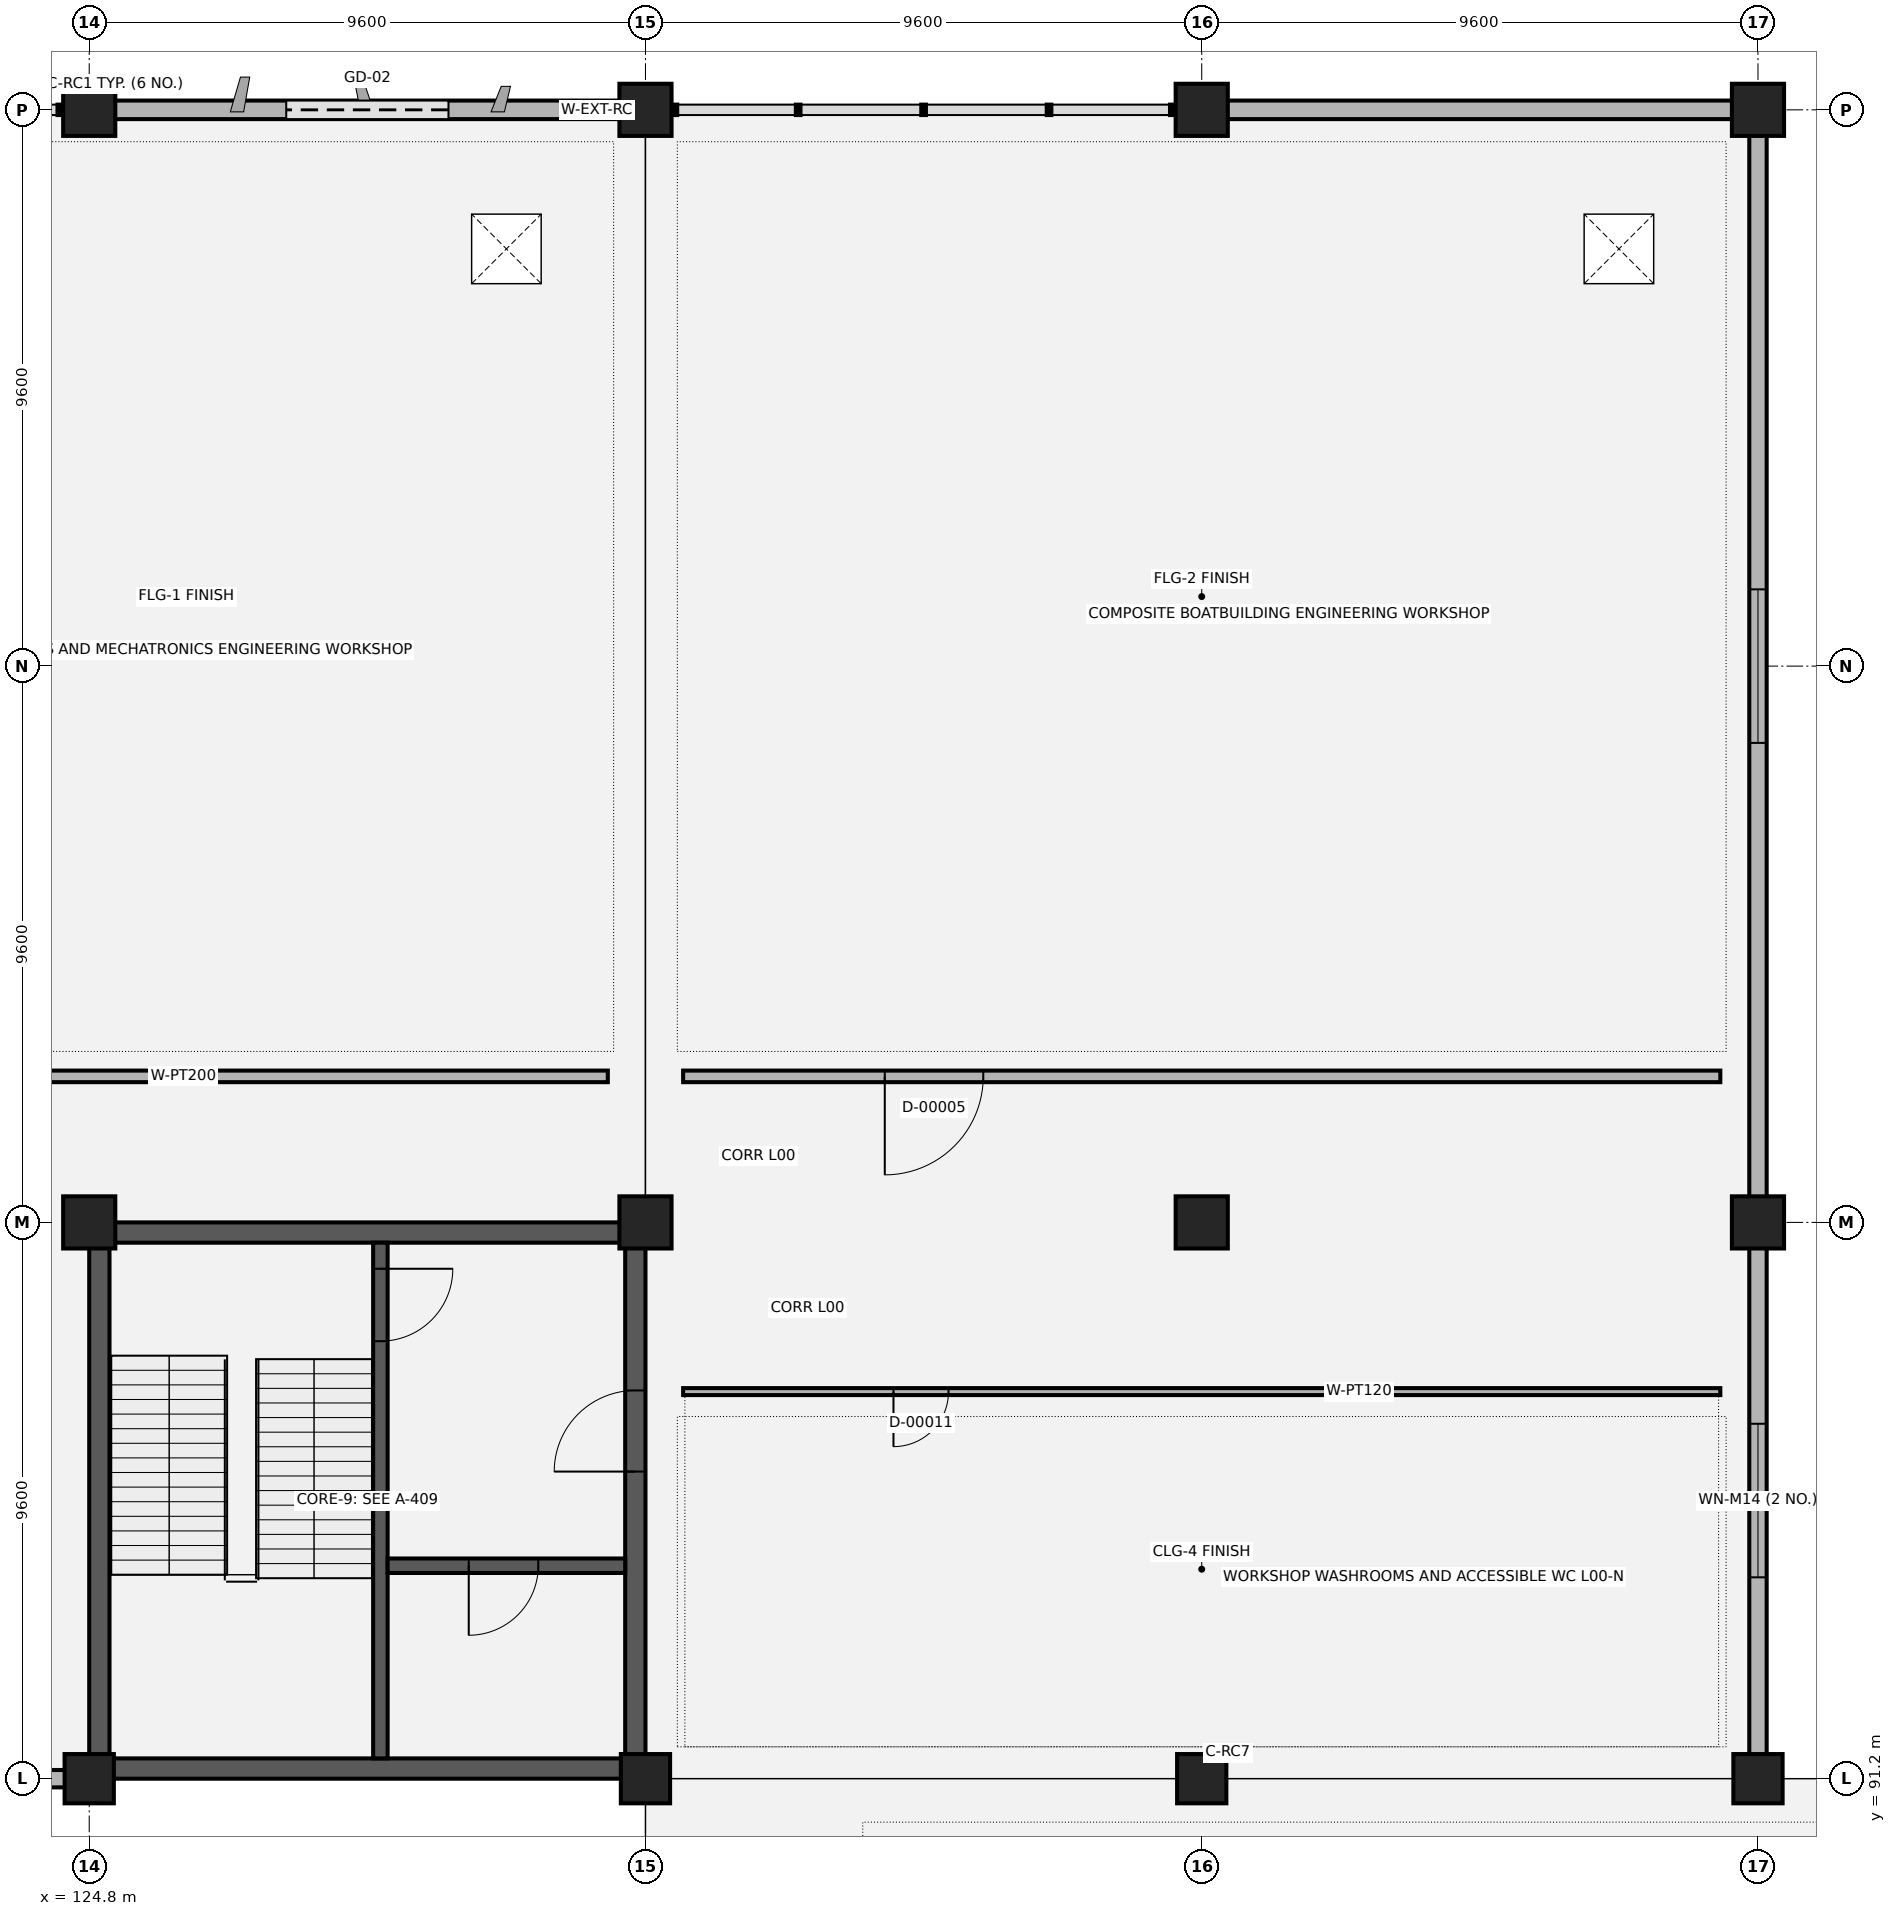
"""IFC4 building model, lengths in metres.
Left out: names, types, materials, properties, quantities, classifications, styles, units other than length and angle.
Written with IfcOpenShell. Run it as: python <this file> out.ifc"""

import sys

from ifc_helpers import new_model, si_unit, direction, frame, frame_2d, origin, origin_2d, place, context, subcontext, project, spatial, rectangle, extrude, element, fill, save


model = new_model("IFC4")
c1 = context("Model", 3, precision=1e-05, world=origin(), true_north=direction((0.0, 1.0)))
c2 = subcontext(c1, "Body", "Model", "MODEL_VIEW")
j1 = project(units=[si_unit("LENGTHUNIT", "METRE"), si_unit("PLANEANGLEUNIT", "RADIAN")], contexts=[c1])
p1 = place(None, origin())
s1 = spatial("IfcSite", under=j1, at=p1, CompositionType="ELEMENT")
p2 = place(p1, origin())
s2 = spatial("IfcBuilding", under=s1, at=p2, CompositionType="ELEMENT")
p3 = place(p2, origin())
s3 = spatial("IfcBuildingStorey", under=s2, at=p3, CompositionType="ELEMENT", Elevation=0.0)
p4 = place(p3, frame((124.8, 91.2, 0.0), z_axis=(0.0, 0.0, 1.0), x_axis=(1.0, 0.0, 0.0)))
e1 = element("IfcColumn", 1, at=p4, inside=s3, PredefinedType="COLUMN", context=c2, shape_type="SweptSolid", body=[
    extrude(rectangle(XDim=0.85, YDim=0.85, at=origin_2d()), origin(), (0.0, 0.0, 1.0), 5.4),
])
for number, where, z_axis, x_axis in (
    (2, (124.8, 100.8, 0.0), (0.0, 0.0, 1.0), (1.0, 0.0, 0.0)),
    (3, (124.8, 120.0, 0.0), (0.0, 0.0, 1.0), (1.0, 0.0, 0.0)),
):
    element("IfcColumn", number, at=place(p3, frame(where, z_axis=z_axis, x_axis=x_axis)), inside=s3, PredefinedType="COLUMN", context=c2, shape_type="SweptSolid", body=[
        extrude(rectangle(XDim=0.9, YDim=0.9, at=origin_2d()), origin(), (0.0, 0.0, 1.0), 5.4),
    ])
p5 = place(p3, frame((134.4, 91.2, 0.0), z_axis=(0.0, 0.0, 1.0), x_axis=(1.0, 0.0, 0.0)))
e4 = element("IfcColumn", 4, at=p5, inside=s3, PredefinedType="COLUMN", context=c2, shape_type="SweptSolid", body=[
    extrude(rectangle(XDim=0.85, YDim=0.85, at=origin_2d()), origin(), (0.0, 0.0, 1.0), 5.4),
])
for number, where, z_axis, x_axis in (
    (5, (134.4, 100.8, 0.0), (0.0, 0.0, 1.0), (1.0, 0.0, 0.0)),
    (6, (134.4, 120.0, 0.0), (0.0, 0.0, 1.0), (1.0, 0.0, 0.0)),
):
    element("IfcColumn", number, at=place(p3, frame(where, z_axis=z_axis, x_axis=x_axis)), inside=s3, PredefinedType="COLUMN", context=c2, shape_type="SweptSolid", body=[
        extrude(rectangle(XDim=0.9, YDim=0.9, at=origin_2d()), origin(), (0.0, 0.0, 1.0), 5.4),
    ])
p6 = place(p3, frame((144.0, 91.2, 0.0), z_axis=(0.0, 0.0, 1.0), x_axis=(1.0, 0.0, 0.0)))
e7 = element("IfcColumn", 7, at=p6, inside=s3, PredefinedType="COLUMN", context=c2, shape_type="SweptSolid", body=[
    extrude(rectangle(XDim=0.85, YDim=0.85, at=origin_2d()), origin(), (0.0, 0.0, 1.0), 5.4),
])
for number, where, z_axis, x_axis in (
    (8, (144.0, 100.8, 0.0), (0.0, 0.0, 1.0), (1.0, 0.0, 0.0)),
    (9, (144.0, 120.0, 0.0), (0.0, 0.0, 1.0), (1.0, 0.0, 0.0)),
):
    element("IfcColumn", number, at=place(p3, frame(where, z_axis=z_axis, x_axis=x_axis)), inside=s3, PredefinedType="COLUMN", context=c2, shape_type="SweptSolid", body=[
        extrude(rectangle(XDim=0.9, YDim=0.9, at=origin_2d()), origin(), (0.0, 0.0, 1.0), 5.4),
    ])
p7 = place(p3, frame((153.6, 91.2, 0.0), z_axis=(0.0, 0.0, 1.0), x_axis=(1.0, 0.0, 0.0)))
e10 = element("IfcColumn", 10, at=p7, inside=s3, PredefinedType="COLUMN", context=c2, shape_type="SweptSolid", body=[
    extrude(rectangle(XDim=0.85, YDim=0.85, at=origin_2d()), origin(), (0.0, 0.0, 1.0), 5.4),
])
for number, where, z_axis, x_axis in (
    (11, (153.6, 100.8, 0.0), (0.0, 0.0, 1.0), (1.0, 0.0, 0.0)),
    (12, (153.6, 120.0, 0.0), (0.0, 0.0, 1.0), (1.0, 0.0, 0.0)),
):
    element("IfcColumn", number, at=place(p3, frame(where, z_axis=z_axis, x_axis=x_axis)), inside=s3, PredefinedType="COLUMN", context=c2, shape_type="SweptSolid", body=[
        extrude(rectangle(XDim=0.9, YDim=0.9, at=origin_2d()), origin(), (0.0, 0.0, 1.0), 5.4),
    ])
p8 = place(p3, frame((115.58, 91.2, 0.0), z_axis=(0.0, 0.0, 1.0), x_axis=(1.0, 0.0, 0.0)))
e13 = element("IfcWall", 13, at=p8, inside=s3, PredefinedType="SOLIDWALL", context=c2, shape_type="SweptSolid", body=[
    extrude(rectangle(XDim=8.84, YDim=0.3, at=frame_2d((4.42, 0.0))), origin(), (0.0, 0.0, 1.0), 4.04),
])
p9 = place(p8, frame((0.91, 0.0, 0.9)))
e14 = element("IfcOpeningElement", 14, at=p9, cuts=e13, PredefinedType="OPENING", context=c2, shape_type="SweptSolid", body=[
    extrude(rectangle(XDim=2.6, YDim=1.8, at=frame_2d((1.3, 0.9))), frame((0.0, 0.16, 0.0), z_axis=(0.0, -1.0, 0.0), x_axis=(1.0, 0.0, 0.0)), (0.0, 0.0, 1.0), 0.32),
])
p10 = place(p8, frame((5.53, 0.0, 0.9)))
e15 = element("IfcOpeningElement", 15, at=p10, cuts=e13, PredefinedType="OPENING", context=c2, shape_type="SweptSolid", body=[
    extrude(rectangle(XDim=2.2, YDim=1.8, at=frame_2d((1.1, 0.9))), frame((0.0, 0.16, 0.0), z_axis=(0.0, -1.0, 0.0), x_axis=(1.0, 0.0, 0.0)), (0.0, 0.0, 1.0), 0.32),
])
p11 = place(p3, frame((134.02, 120.0, 0.0), z_axis=(0.0, 0.0, 1.0), x_axis=(-1.0, 0.0, 0.0)))
e16 = element("IfcWall", 16, at=p11, inside=s3, PredefinedType="SOLIDWALL", context=c2, shape_type="SweptSolid", body=[
    extrude(rectangle(XDim=8.84, YDim=0.32, at=frame_2d((4.42, 0.0))), origin(), (0.0, 0.0, 1.0), 4.04),
])
p12 = place(p11, frame((3.02, 0.0, 0.0)))
e17 = element("IfcOpeningElement", 17, at=p12, cuts=e16, PredefinedType="OPENING", context=c2, shape_type="SweptSolid", body=[
    extrude(rectangle(XDim=2.8, YDim=2.8, at=frame_2d((1.4, 1.4))), frame((0.0, 0.17, 0.0), z_axis=(0.0, -1.0, 0.0), x_axis=(1.0, 0.0, 0.0)), (0.0, 0.0, 1.0), 0.34),
])
p13 = place(p3, frame((153.22, 120.0, 0.0), z_axis=(0.0, 0.0, 1.0), x_axis=(-1.0, 0.0, 0.0)))
e18 = element("IfcWall", 18, at=p13, inside=s3, PredefinedType="SOLIDWALL", context=c2, shape_type="SweptSolid", body=[
    extrude(rectangle(XDim=8.84, YDim=0.32, at=frame_2d((4.42, 0.0))), origin(), (0.0, 0.0, 1.0), 4.04),
])
p14 = place(p3, frame((153.6, 91.58, 0.0), z_axis=(0.0, 0.0, 1.0), x_axis=(0.0, 1.0, 0.0)))
e19 = element("IfcWall", 19, at=p14, inside=s3, PredefinedType="SOLIDWALL", context=c2, shape_type="SweptSolid", body=[
    extrude(rectangle(XDim=8.84, YDim=0.3, at=frame_2d((4.42, 0.0))), origin(), (0.0, 0.0, 1.0), 4.14),
])
p15 = place(p14, frame((3.095, 0.0, 0.9)))
e20 = element("IfcOpeningElement", 20, at=p15, cuts=e19, PredefinedType="OPENING", context=c2, shape_type="SweptSolid", body=[
    extrude(rectangle(XDim=2.65, YDim=1.75, at=frame_2d((1.325, 0.875))), frame((0.0, 0.16, 0.0), z_axis=(0.0, -1.0, 0.0), x_axis=(1.0, 0.0, 0.0)), (0.0, 0.0, 1.0), 0.32),
])
p16 = place(p3, frame((153.6, 101.18, 0.0), z_axis=(0.0, 0.0, 1.0), x_axis=(0.0, 1.0, 0.0)))
e21 = element("IfcWall", 21, at=p16, inside=s3, PredefinedType="SOLIDWALL", context=c2, shape_type="SweptSolid", body=[
    extrude(rectangle(XDim=18.44, YDim=0.3, at=frame_2d((9.22, 0.0))), origin(), (0.0, 0.0, 1.0), 4.14),
])
p17 = place(p16, frame((7.895, 0.0, 0.9)))
e22 = element("IfcOpeningElement", 22, at=p17, cuts=e21, PredefinedType="OPENING", context=c2, shape_type="SweptSolid", body=[
    extrude(rectangle(XDim=2.65, YDim=1.75, at=frame_2d((1.325, 0.875))), frame((0.0, 0.16, 0.0), z_axis=(0.0, -1.0, 0.0), x_axis=(1.0, 0.0, 0.0)), (0.0, 0.0, 1.0), 0.32),
])
for number, where, z_axis, x_axis in (
    (23, (124.8, 100.625, 0.0), (0.0, 0.0, 1.0), (1.0, 0.0, 0.0)),
    (24, (124.8, 91.375, 0.0), (0.0, 0.0, 1.0), (1.0, 0.0, 0.0)),
):
    element("IfcWall", number, at=place(p3, frame(where, z_axis=z_axis, x_axis=x_axis)), inside=s3, PredefinedType="SHEAR", context=c2, shape_type="SweptSolid", body=[
        extrude(rectangle(XDim=9.6, YDim=0.35, at=frame_2d((4.8, 0.0))), origin(), (0.0, 0.0, 1.0), 5.11),
    ])
p18 = place(p3, frame((124.975, 91.2, 0.0), z_axis=(0.0, 0.0, 1.0), x_axis=(0.0, 1.0, 0.0)))
e25 = element("IfcWall", 25, at=p18, inside=s3, PredefinedType="SHEAR", context=c2, shape_type="SweptSolid", body=[
    extrude(rectangle(XDim=9.6, YDim=0.35, at=frame_2d((4.8, 0.0))), origin(), (0.0, 0.0, 1.0), 5.11),
])
p19 = place(p3, frame((134.225, 91.2, 0.0), z_axis=(0.0, 0.0, 1.0), x_axis=(0.0, 1.0, 0.0)))
e26 = element("IfcWall", 26, at=p19, inside=s3, PredefinedType="SHEAR", context=c2, shape_type="SweptSolid", body=[
    extrude(rectangle(XDim=9.6, YDim=0.35, at=frame_2d((4.8, 0.0))), origin(), (0.0, 0.0, 1.0), 5.11),
])
p20 = place(p19, frame((5.3, 0.0, 0.0)))
e27 = element("IfcOpeningElement", 27, at=p20, cuts=e26, PredefinedType="OPENING", context=c2, shape_type="SweptSolid", body=[
    extrude(rectangle(XDim=1.4, YDim=2.15, at=frame_2d((0.7, 1.075))), frame((0.0, 0.185, 0.0), z_axis=(0.0, -1.0, 0.0), x_axis=(1.0, 0.0, 0.0)), (0.0, 0.0, 1.0), 0.37),
])
p21 = place(p3, frame((129.825, 100.45, 0.0), z_axis=(0.0, 0.0, 1.0), x_axis=(0.0, -1.0, 0.0)))
e28 = element("IfcWall", 28, at=p21, inside=s3, PredefinedType="SHEAR", context=c2, shape_type="SweptSolid", body=[
    extrude(rectangle(XDim=8.9, YDim=0.25, at=frame_2d((4.45, 0.0))), origin(), (0.0, 0.0, 1.0), 5.11),
])
p22 = place(p21, frame((0.45, 0.0, 0.0)))
e29 = element("IfcOpeningElement", 29, at=p22, cuts=e28, PredefinedType="OPENING", context=c2, shape_type="SweptSolid", body=[
    extrude(rectangle(XDim=1.25, YDim=2.15, at=frame_2d((0.625, 1.075))), frame((0.0, 0.135, 0.0), z_axis=(0.0, -1.0, 0.0), x_axis=(1.0, 0.0, 0.0)), (0.0, 0.0, 1.0), 0.27),
])
p23 = place(p3, frame((129.95, 94.875, 0.0), z_axis=(0.0, 0.0, 1.0), x_axis=(1.0, 0.0, 0.0)))
e30 = element("IfcWall", 30, at=p23, inside=s3, PredefinedType="SHEAR", context=c2, shape_type="SweptSolid", body=[
    extrude(rectangle(XDim=4.1, YDim=0.25, at=frame_2d((2.05, 0.0))), origin(), (0.0, 0.0, 1.0), 5.11),
])
p24 = place(p23, frame((1.4, 0.0, 0.0)))
e31 = element("IfcOpeningElement", 31, at=p24, cuts=e30, PredefinedType="OPENING", context=c2, shape_type="SweptSolid", body=[
    extrude(rectangle(XDim=1.2, YDim=2.15, at=frame_2d((0.6, 1.075))), frame((0.0, 0.135, 0.0), z_axis=(0.0, -1.0, 0.0), x_axis=(1.0, 0.0, 0.0)), (0.0, 0.0, 1.0), 0.27),
])
p25 = place(p3, frame((106.25, 103.32, 0.0), z_axis=(0.0, 0.0, 1.0), x_axis=(1.0, 0.0, 0.0)))
e32 = element("IfcWall", 32, at=p25, inside=s3, PredefinedType="PARTITIONING", context=c2, shape_type="SweptSolid", body=[
    extrude(rectangle(XDim=27.5, YDim=0.2, at=frame_2d((13.75, 0.0))), origin(), (0.0, 0.0, 1.0), 4.04),
])
p26 = place(p25, frame((4.135, 0.0, 0.0)))
e33 = element("IfcOpeningElement", 33, at=p26, cuts=e32, PredefinedType="OPENING", context=c2, shape_type="SweptSolid", body=[
    extrude(rectangle(XDim=1.8, YDim=2.2, at=frame_2d((0.9, 1.1))), frame((0.0, 0.11, 0.0), z_axis=(0.0, -1.0, 0.0), x_axis=(1.0, 0.0, 0.0)), (0.0, 0.0, 1.0), 0.22),
])
p27 = place(p3, frame((135.05, 103.32, 0.0), z_axis=(0.0, 0.0, 1.0), x_axis=(1.0, 0.0, 0.0)))
e34 = element("IfcWall", 34, at=p27, inside=s3, PredefinedType="PARTITIONING", context=c2, shape_type="SweptSolid", body=[
    extrude(rectangle(XDim=17.9, YDim=0.2, at=frame_2d((8.95, 0.0))), origin(), (0.0, 0.0, 1.0), 4.04),
])
p28 = place(p27, frame((3.48, 0.0, 0.0)))
e35 = element("IfcOpeningElement", 35, at=p28, cuts=e34, PredefinedType="OPENING", context=c2, shape_type="SweptSolid", body=[
    extrude(rectangle(XDim=1.7, YDim=2.2, at=frame_2d((0.85, 1.1))), frame((0.0, 0.11, 0.0), z_axis=(0.0, -1.0, 0.0), x_axis=(1.0, 0.0, 0.0)), (0.0, 0.0, 1.0), 0.22),
])
p29 = place(p3, frame((135.05, 97.88, 0.0), z_axis=(0.0, 0.0, 1.0), x_axis=(1.0, 0.0, 0.0)))
e36 = element("IfcWall", 36, at=p29, inside=s3, PredefinedType="PARTITIONING", context=c2, shape_type="SweptSolid", body=[
    extrude(rectangle(XDim=17.9, YDim=0.12, at=frame_2d((8.95, 0.0))), origin(), (0.0, 0.0, 1.0), 4.04),
])
p30 = place(p29, frame((3.63, 0.0, 0.0)))
e37 = element("IfcOpeningElement", 37, at=p30, cuts=e36, PredefinedType="OPENING", context=c2, shape_type="SweptSolid", body=[
    extrude(rectangle(XDim=0.95, YDim=2.1, at=frame_2d((0.475, 1.05))), frame((0.0, 0.07, 0.0), z_axis=(0.0, -1.0, 0.0), x_axis=(1.0, 0.0, 0.0)), (0.0, 0.0, 1.0), 0.14),
])
p31 = place(p12, origin())
e38 = element("IfcDoor", 38, at=p31, inside=s3, OperationType="ROLLINGUP", PredefinedType="GATE", context=c2, shape_type="SweptSolid", body=[
    extrude(rectangle(XDim=2.8, YDim=2.8, at=frame_2d((1.4, 1.4))), frame((0.0, 0.025, 0.0), z_axis=(0.0, -1.0, 0.0), x_axis=(1.0, 0.0, 0.0)), (0.0, 0.0, 1.0), 0.05),
])
fill(e17, e38)
p32 = place(p15, origin())
e39 = element("IfcWindow", 39, at=p32, inside=s3, PartitioningType="SINGLE_PANEL", PredefinedType="WINDOW", context=c2, shape_type="SweptSolid", body=[
    extrude(rectangle(XDim=2.65, YDim=1.75, at=frame_2d((1.325, 0.875))), frame((0.0, 0.03, 0.0), z_axis=(0.0, -1.0, 0.0), x_axis=(1.0, 0.0, 0.0)), (0.0, 0.0, 1.0), 0.06),
])
fill(e20, e39)
p33 = place(p17, origin())
e40 = element("IfcWindow", 40, at=p33, inside=s3, PartitioningType="SINGLE_PANEL", PredefinedType="WINDOW", context=c2, shape_type="SweptSolid", body=[
    extrude(rectangle(XDim=2.65, YDim=1.75, at=frame_2d((1.325, 0.875))), frame((0.0, 0.03, 0.0), z_axis=(0.0, -1.0, 0.0), x_axis=(1.0, 0.0, 0.0)), (0.0, 0.0, 1.0), 0.06),
])
fill(e22, e40)
p34 = place(p22, origin())
e41 = element("IfcDoor", 41, at=p34, inside=s3, OperationType="SINGLE_SWING_LEFT", PredefinedType="DOOR", context=c2, shape_type="SweptSolid", body=[
    extrude(rectangle(XDim=1.25, YDim=2.15, at=frame_2d((0.625, 1.075))), frame((0.0, 0.025, 0.0), z_axis=(0.0, -1.0, 0.0), x_axis=(1.0, 0.0, 0.0)), (0.0, 0.0, 1.0), 0.05),
])
fill(e29, e41)
p35 = place(p24, origin())
e42 = element("IfcDoor", 42, at=p35, inside=s3, OperationType="SINGLE_SWING_RIGHT", PredefinedType="DOOR", context=c2, shape_type="SweptSolid", body=[
    extrude(rectangle(XDim=1.2, YDim=2.15, at=frame_2d((0.6, 1.075))), frame((0.0, 0.025, 0.0), z_axis=(0.0, -1.0, 0.0), x_axis=(1.0, 0.0, 0.0)), (0.0, 0.0, 1.0), 0.05),
])
fill(e31, e42)
p36 = place(p20, origin())
e43 = element("IfcDoor", 43, at=p36, inside=s3, OperationType="SINGLE_SWING_LEFT", PredefinedType="DOOR", context=c2, shape_type="SweptSolid", body=[
    extrude(rectangle(XDim=1.4, YDim=2.15, at=frame_2d((0.7, 1.075))), frame((0.0, 0.025, 0.0), z_axis=(0.0, -1.0, 0.0), x_axis=(1.0, 0.0, 0.0)), (0.0, 0.0, 1.0), 0.05),
])
fill(e27, e43)
p37 = place(p28, origin())
e44 = element("IfcDoor", 44, at=p37, inside=s3, OperationType="SINGLE_SWING_RIGHT", PredefinedType="DOOR", context=c2, shape_type="SweptSolid", body=[
    extrude(rectangle(XDim=1.7, YDim=2.2, at=frame_2d((0.85, 1.1))), frame((0.0, 0.025, 0.0), z_axis=(0.0, -1.0, 0.0), x_axis=(1.0, 0.0, 0.0)), (0.0, 0.0, 1.0), 0.05),
])
fill(e35, e44)
p38 = place(p30, origin())
e45 = element("IfcDoor", 45, at=p38, inside=s3, OperationType="SINGLE_SWING_RIGHT", PredefinedType="DOOR", context=c2, shape_type="SweptSolid", body=[
    extrude(rectangle(XDim=0.95, YDim=2.1, at=frame_2d((0.475, 1.05))), frame((0.0, 0.025, 0.0), z_axis=(0.0, -1.0, 0.0), x_axis=(1.0, 0.0, 0.0)), (0.0, 0.0, 1.0), 0.05),
])
fill(e37, e45)
save(model, sys.argv[1])
